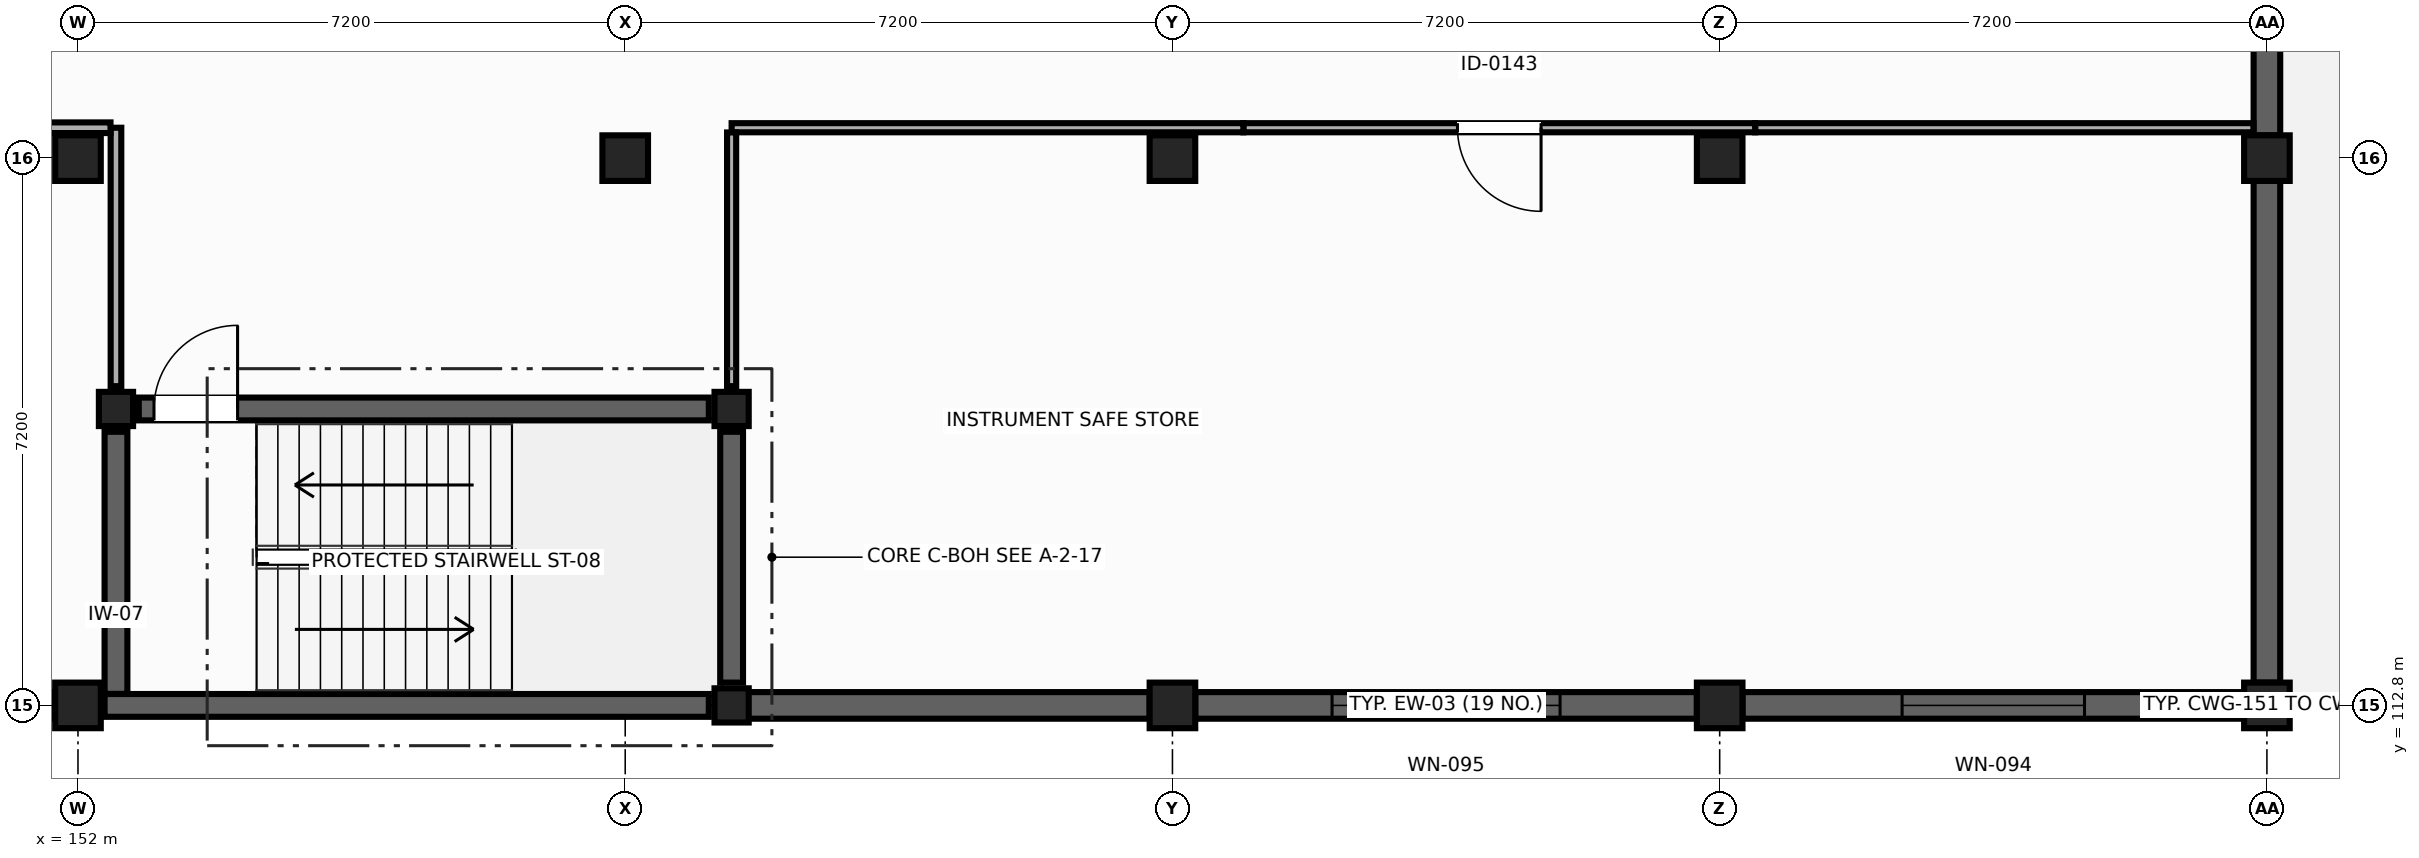
"""IFC4 building model, lengths in metres.
Left out: names, types, materials, properties, quantities, classifications, styles, units other than length and angle.
Written with IfcOpenShell. Run it as: python <this file> out.ifc"""

import sys

from ifc_helpers import new_model, si_unit, direction, frame, frame_2d, origin, origin_2d, place, context, subcontext, project, spatial, rectangle, extrude, element, fill, save


model = new_model("IFC4")
c1 = context("Model", 3, precision=1e-05, world=origin(), true_north=direction((0.0, 1.0)))
c2 = subcontext(c1, "Body", "Model", "MODEL_VIEW")
j1 = project(units=[si_unit("LENGTHUNIT", "METRE"), si_unit("PLANEANGLEUNIT", "RADIAN")], contexts=[c1])
p1 = place(None, origin())
s1 = spatial("IfcSite", under=j1, at=p1, CompositionType="ELEMENT")
p2 = place(p1, origin())
s2 = spatial("IfcBuilding", under=s1, at=p2, CompositionType="ELEMENT")
p3 = place(p2, frame((0.0, 0.0, 9.9)))
s3 = spatial("IfcBuildingStorey", under=s2, at=p3, CompositionType="ELEMENT", Elevation=9.9)
for number, where, z_axis, x_axis in (
    (1, (152.0, 112.8, 0.0), (0.0, 0.0, 1.0), (1.0, 0.0, 0.0)),
    (2, (166.4, 112.8, 0.0), (0.0, 0.0, 1.0), (0.0, 1.0, 0.0)),
):
    element("IfcColumn", number, at=place(p3, frame(where, z_axis=z_axis, x_axis=x_axis)), inside=s3, PredefinedType="COLUMN", context=c2, shape_type="SweptSolid", body=[
        extrude(rectangle(XDim=0.6, YDim=0.6, at=origin_2d()), origin(), (0.0, 0.0, 1.0), 4.5),
    ])
for number, where, z_axis, x_axis in (
    (3, (173.6, 112.8, 0.0), (0.0, 0.0, 1.0), (1.0, 0.0, 0.0)),
    (4, (180.8, 112.8, 0.0), (0.0, 0.0, 1.0), (0.0, 1.0, 0.0)),
):
    element("IfcColumn", number, at=place(p3, frame(where, z_axis=z_axis, x_axis=x_axis)), inside=s3, PredefinedType="COLUMN", context=c2, shape_type="SweptSolid", body=[
        extrude(rectangle(XDim=0.6, YDim=0.6, at=origin_2d()), origin(), (0.0, 0.0, 1.0), 4.346),
    ])
for number, where, z_axis, x_axis in (
    (5, (152.0, 120.0, 0.0), (0.0, 0.0, 1.0), (1.0, 0.0, 0.0)),
    (6, (159.2, 120.0, 0.0), (0.0, 0.0, 1.0), (0.0, 1.0, 0.0)),
    (7, (166.4, 120.0, 0.0), (0.0, 0.0, 1.0), (1.0, 0.0, 0.0)),
):
    element("IfcColumn", number, at=place(p3, frame(where, z_axis=z_axis, x_axis=x_axis)), inside=s3, PredefinedType="COLUMN", context=c2, shape_type="SweptSolid", body=[
        extrude(rectangle(XDim=0.6, YDim=0.6, at=origin_2d()), origin(), (0.0, 0.0, 1.0), 4.5),
    ])
for number, where, z_axis, x_axis in (
    (8, (173.6, 120.0, 0.0), (0.0, 0.0, 1.0), (0.0, 1.0, 0.0)),
    (9, (180.8, 120.0, 0.0), (0.0, 0.0, 1.0), (1.0, 0.0, 0.0)),
):
    element("IfcColumn", number, at=place(p3, frame(where, z_axis=z_axis, x_axis=x_axis)), inside=s3, PredefinedType="COLUMN", context=c2, shape_type="SweptSolid", body=[
        extrude(rectangle(XDim=0.6, YDim=0.6, at=origin_2d()), origin(), (0.0, 0.0, 1.0), 5.822),
    ])
for number, where, z_axis, x_axis in (
    (10, (160.6, 112.8, 0.0), (0.0, 0.0, 1.0), (1.0, 0.0, 0.0)),
    (11, (160.6, 116.7, 0.0), (0.0, 0.0, 1.0), (1.0, 0.0, 0.0)),
    (12, (152.5, 116.7, 0.0), (0.0, 0.0, 1.0), (1.0, 0.0, 0.0)),
):
    element("IfcColumn", number, at=place(p3, frame(where, z_axis=z_axis, x_axis=x_axis)), inside=s3, PredefinedType="COLUMN", context=c2, shape_type="SweptSolid", body=[
        extrude(rectangle(XDim=0.45, YDim=0.45, at=origin_2d()), origin(), (0.0, 0.0, 1.0), 4.5),
    ])
p4 = place(p3, frame((180.5, 112.8, 0.0), z_axis=(0.0, 0.0, 1.0), x_axis=(-1.0, 0.0, 0.0)))
e13 = element("IfcWall", 13, at=p4, inside=s3, PredefinedType="SOLIDWALL", context=c2, shape_type="SweptSolid", body=[
    extrude(rectangle(XDim=6.6, YDim=0.35, at=frame_2d((3.3, 0.0))), origin(), (0.0, 0.0, 1.0), 4.346),
])
p5 = place(p4, frame((2.1, 0.0, 0.85)))
e14 = element("IfcOpeningElement", 14, at=p5, cuts=e13, PredefinedType="OPENING", context=c2, shape_type="SweptSolid", body=[
    extrude(rectangle(XDim=2.4, YDim=1.2, at=frame_2d((1.2, 0.6))), frame((0.0, 0.185, 0.0), z_axis=(0.0, -1.0, 0.0), x_axis=(1.0, 0.0, 0.0)), (0.0, 0.0, 1.0), 0.37),
])
p6 = place(p3, frame((173.3, 112.8, 0.0), z_axis=(0.0, 0.0, 1.0), x_axis=(-1.0, 0.0, 0.0)))
e15 = element("IfcWall", 15, at=p6, inside=s3, PredefinedType="SOLIDWALL", context=c2, shape_type="SweptSolid", body=[
    extrude(rectangle(XDim=6.6, YDim=0.35, at=frame_2d((3.3, 0.0))), origin(), (0.0, 0.0, 1.0), 4.346),
])
p7 = place(p6, frame((1.8, 0.0, 0.85)))
e16 = element("IfcOpeningElement", 16, at=p7, cuts=e15, PredefinedType="OPENING", context=c2, shape_type="SweptSolid", body=[
    extrude(rectangle(XDim=3.0, YDim=1.2, at=frame_2d((1.5, 0.6))), frame((0.0, 0.185, 0.0), z_axis=(0.0, -1.0, 0.0), x_axis=(1.0, 0.0, 0.0)), (0.0, 0.0, 1.0), 0.37),
])
p8 = place(p3, frame((166.1, 112.8, 0.0), z_axis=(0.0, 0.0, 1.0), x_axis=(-1.0, 0.0, 0.0)))
e17 = element("IfcWall", 17, at=p8, inside=s3, PredefinedType="SOLIDWALL", context=c2, shape_type="SweptSolid", body=[
    extrude(rectangle(XDim=5.35, YDim=0.35, at=frame_2d((2.675, 0.0))), origin(), (0.0, 0.0, 1.0), 4.22),
])
p9 = place(p3, frame((151.7, 112.8, 0.0), z_axis=(0.0, 0.0, 1.0), x_axis=(-1.0, 0.0, 0.0)))
e18 = element("IfcWall", 18, at=p9, inside=s3, PredefinedType="SOLIDWALL", context=c2, shape_type="SweptSolid", body=[
    extrude(rectangle(XDim=6.6, YDim=0.35, at=frame_2d((3.3, 0.0))), origin(), (0.0, 0.0, 1.0), 4.22),
])
p10 = place(p9, frame((1.5, 0.0, 0.85)))
e19 = element("IfcOpeningElement", 19, at=p10, cuts=e18, PredefinedType="OPENING", context=c2, shape_type="SweptSolid", body=[
    extrude(rectangle(XDim=3.6, YDim=1.2, at=frame_2d((1.8, 0.6))), frame((0.0, 0.185, 0.0), z_axis=(0.0, -1.0, 0.0), x_axis=(1.0, 0.0, 0.0)), (0.0, 0.0, 1.0), 0.37),
])
for number, where, z_axis, x_axis in (
    (20, (180.8, 126.9, 0.0), (0.0, 0.0, 1.0), (0.0, -1.0, 0.0)),
    (21, (180.8, 119.7, 0.0), (0.0, 0.0, 1.0), (0.0, -1.0, 0.0)),
):
    element("IfcWall", number, at=place(p3, frame(where, z_axis=z_axis, x_axis=x_axis)), inside=s3, PredefinedType="SOLIDWALL", context=c2, shape_type="SweptSolid", body=[
        extrude(rectangle(XDim=6.6, YDim=0.35, at=frame_2d((3.3, 0.0))), origin(), (0.0, 0.0, 1.0), 4.5),
    ])
p11 = place(p3, frame((160.3, 112.8, 0.0), z_axis=(0.0, 0.0, 1.0), x_axis=(-1.0, 0.0, 0.0)))
e22 = element("IfcWall", 22, at=p11, inside=s3, PredefinedType="SHEAR", context=c2, shape_type="SweptSolid", body=[
    extrude(rectangle(XDim=7.95, YDim=0.3, at=frame_2d((3.975, 0.0))), origin(), (0.0, 0.0, 1.0), 4.22),
])
p12 = place(p3, frame((152.5, 112.952, 0.0), z_axis=(0.0, 0.0, 1.0), x_axis=(0.0, 1.0, 0.0)))
e23 = element("IfcWall", 23, at=p12, inside=s3, PredefinedType="SHEAR", context=c2, shape_type="SweptSolid", body=[
    extrude(rectangle(XDim=3.448, YDim=0.3, at=frame_2d((1.724, 0.0))), origin(), (0.0, 0.0, 1.0), 4.22),
])
p13 = place(p3, frame((152.8, 116.7, 0.0), z_axis=(0.0, 0.0, 1.0), x_axis=(1.0, 0.0, 0.0)))
e24 = element("IfcWall", 24, at=p13, inside=s3, PredefinedType="SHEAR", context=c2, shape_type="SweptSolid", body=[
    extrude(rectangle(XDim=7.5, YDim=0.3, at=frame_2d((3.75, 0.0))), origin(), (0.0, 0.0, 1.0), 4.22),
])
p14 = place(p13, frame((0.2, 0.0, 0.0)))
e25 = element("IfcOpeningElement", 25, at=p14, cuts=e24, PredefinedType="OPENING", context=c2, shape_type="SweptSolid", body=[
    extrude(rectangle(XDim=1.1, YDim=2.15, at=frame_2d((0.55, 1.075))), frame((0.0, 0.16, 0.0), z_axis=(0.0, -1.0, 0.0), x_axis=(1.0, 0.0, 0.0)), (0.0, 0.0, 1.0), 0.32),
])
p15 = place(p3, frame((160.6, 116.4, 0.0), z_axis=(0.0, 0.0, 1.0), x_axis=(0.0, -1.0, 0.0)))
e26 = element("IfcWall", 26, at=p15, inside=s3, PredefinedType="SHEAR", context=c2, shape_type="SweptSolid", body=[
    extrude(rectangle(XDim=3.3, YDim=0.3, at=frame_2d((1.65, 0.0))), origin(), (0.0, 0.0, 1.0), 4.22),
])
p16 = place(p3, frame((152.5, 117.0, 0.0), z_axis=(0.0, 0.0, 1.0), x_axis=(0.0, 1.0, 0.0)))
e27 = element("IfcWall", 27, at=p16, inside=s3, PredefinedType="PARTITIONING", context=c2, shape_type="SweptSolid", body=[
    extrude(rectangle(XDim=3.4, YDim=0.14, at=frame_2d((1.7, 0.0))), origin(), (0.0, 0.0, 1.0), 3.715),
])
p17 = place(p3, frame((152.428, 120.4, 0.0), z_axis=(0.0, 0.0, 1.0), x_axis=(-1.0, 0.0, 0.0)))
e28 = element("IfcWall", 28, at=p17, inside=s3, PredefinedType="PARTITIONING", context=c2, shape_type="SweptSolid", body=[
    extrude(rectangle(XDim=7.253, YDim=0.14, at=frame_2d((3.626, 0.0))), origin(), (0.0, 0.0, 1.0), 3.515),
])
p18 = place(p3, frame((180.623, 120.4, 0.0), z_axis=(0.0, 0.0, 1.0), x_axis=(-1.0, 0.0, 0.0)))
e29 = element("IfcWall", 29, at=p18, inside=s3, PredefinedType="PARTITIONING", context=c2, shape_type="SweptSolid", body=[
    extrude(rectangle(XDim=6.556, YDim=0.12, at=frame_2d((3.278, 0.0))), origin(), (0.0, 0.0, 1.0), 5.903),
])
p19 = place(p3, frame((174.067, 120.4, 0.0), z_axis=(0.0, 0.0, 1.0), x_axis=(-1.0, 0.0, 0.0)))
e30 = element("IfcWall", 30, at=p19, inside=s3, PredefinedType="PARTITIONING", context=c2, shape_type="SweptSolid", body=[
    extrude(rectangle(XDim=6.733, YDim=0.12, at=frame_2d((3.367, 0.0))), origin(), (0.0, 0.0, 1.0), 5.903),
])
p20 = place(p19, frame((2.817, 0.0, 0.0)))
e31 = element("IfcOpeningElement", 31, at=p20, cuts=e30, PredefinedType="OPENING", context=c2, shape_type="SweptSolid", body=[
    extrude(rectangle(XDim=1.1, YDim=2.15, at=frame_2d((0.55, 1.075))), frame((0.0, 0.07, 0.0), z_axis=(0.0, -1.0, 0.0), x_axis=(1.0, 0.0, 0.0)), (0.0, 0.0, 1.0), 0.14),
])
p21 = place(p3, frame((167.333, 120.4, 0.0), z_axis=(0.0, 0.0, 1.0), x_axis=(-1.0, 0.0, 0.0)))
e32 = element("IfcWall", 32, at=p21, inside=s3, PredefinedType="PARTITIONING", context=c2, shape_type="SweptSolid", body=[
    extrude(rectangle(XDim=6.733, YDim=0.12, at=frame_2d((3.367, 0.0))), origin(), (0.0, 0.0, 1.0), 3.515),
])
p22 = place(p3, frame((160.6, 120.338, 0.0), z_axis=(0.0, 0.0, 1.0), x_axis=(0.0, -1.0, 0.0)))
e33 = element("IfcWall", 33, at=p22, inside=s3, PredefinedType="PARTITIONING", context=c2, shape_type="SweptSolid", body=[
    extrude(rectangle(XDim=3.338, YDim=0.12, at=frame_2d((1.669, 0.0))), origin(), (0.0, 0.0, 1.0), 3.715),
])
p23 = place(p5, origin())
e34 = element("IfcWindow", 34, at=p23, inside=s3, PartitioningType="SINGLE_PANEL", PredefinedType="WINDOW", context=c2, shape_type="SweptSolid", body=[
    extrude(rectangle(XDim=2.4, YDim=1.2, at=frame_2d((1.2, 0.6))), frame((0.0, 0.03, 0.0), z_axis=(0.0, -1.0, 0.0), x_axis=(1.0, 0.0, 0.0)), (0.0, 0.0, 1.0), 0.06),
])
fill(e14, e34)
p24 = place(p7, origin())
e35 = element("IfcWindow", 35, at=p24, inside=s3, PartitioningType="SINGLE_PANEL", PredefinedType="WINDOW", context=c2, shape_type="SweptSolid", body=[
    extrude(rectangle(XDim=3.0, YDim=1.2, at=frame_2d((1.5, 0.6))), frame((0.0, 0.03, 0.0), z_axis=(0.0, -1.0, 0.0), x_axis=(1.0, 0.0, 0.0)), (0.0, 0.0, 1.0), 0.06),
])
fill(e16, e35)
p25 = place(p14, origin())
e36 = element("IfcDoor", 36, at=p25, inside=s3, OperationType="SINGLE_SWING_RIGHT", PredefinedType="DOOR", context=c2, shape_type="SweptSolid", body=[
    extrude(rectangle(XDim=1.1, YDim=2.15, at=frame_2d((0.55, 1.075))), frame((0.0, 0.025, 0.0), z_axis=(0.0, -1.0, 0.0), x_axis=(1.0, 0.0, 0.0)), (0.0, 0.0, 1.0), 0.05),
])
fill(e25, e36)
p26 = place(p20, origin())
e37 = element("IfcDoor", 37, at=p26, inside=s3, OperationType="SINGLE_SWING_LEFT", PredefinedType="DOOR", context=c2, shape_type="SweptSolid", body=[
    extrude(rectangle(XDim=1.1, YDim=2.15, at=frame_2d((0.55, 1.075))), frame((0.0, 0.025, 0.0), z_axis=(0.0, -1.0, 0.0), x_axis=(1.0, 0.0, 0.0)), (0.0, 0.0, 1.0), 0.05),
])
fill(e31, e37)
save(model, sys.argv[1])
